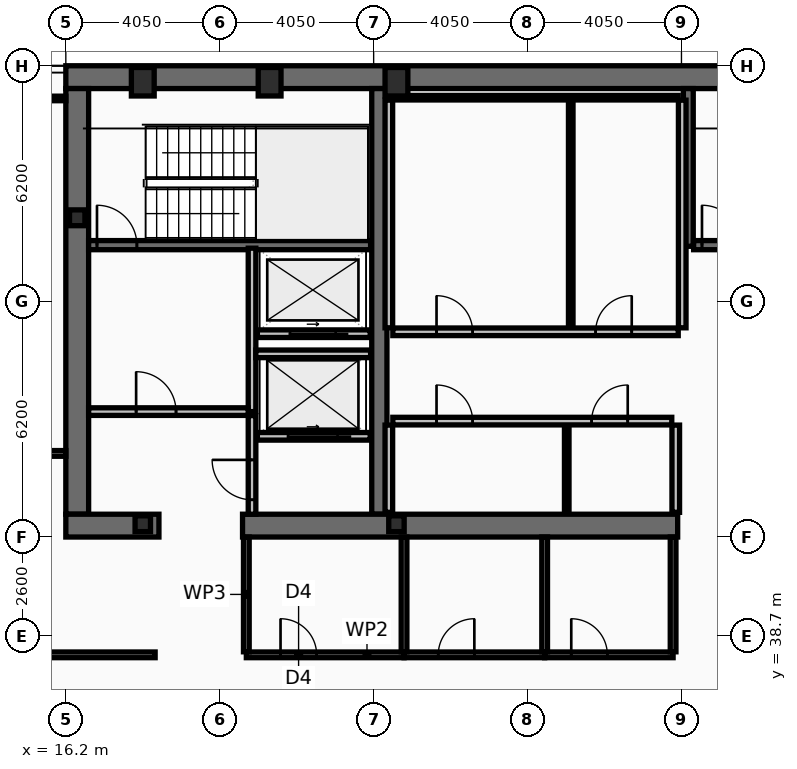
"""IFC4 building model, lengths in metres.
Left out: names, types, materials, properties, quantities, classifications, styles, units other than length and angle.
Written with IfcOpenShell. Run it as: python <this file> out.ifc"""

import sys

from ifc_helpers import new_model, si_unit, direction, frame, frame_2d, origin, origin_2d, place, context, subcontext, project, spatial, rectangle, hollow_rectangle, i_section, extrude, element, fill, save


model = new_model("IFC4")
c1 = context("Model", 3, precision=1e-05, world=origin(), true_north=direction((0.0, 1.0)))
c2 = subcontext(c1, "Body", "Model", "MODEL_VIEW")
j1 = project(units=[si_unit("LENGTHUNIT", "METRE"), si_unit("PLANEANGLEUNIT", "RADIAN")], contexts=[c1])
p1 = place(None, origin())
s1 = spatial("IfcSite", under=j1, at=p1, CompositionType="ELEMENT")
p2 = place(p1, origin())
s2 = spatial("IfcBuilding", under=s1, at=p2, CompositionType="ELEMENT")
p3 = place(p2, frame((0.0, 0.0, 235.4)))
s3 = spatial("IfcBuildingStorey", under=s2, at=p3, CompositionType="ELEMENT", Elevation=235.4)
p4 = place(p3, frame((16.2, 53.4, 0.0), z_axis=(0.0, 0.0, 1.0), x_axis=(1.0, 0.0, 0.0)))
e1 = element("IfcWall", 1, at=p4, inside=s3, PredefinedType="SHEAR", context=c2, shape_type="SweptSolid", body=[
    extrude(rectangle(XDim=40.5, YDim=0.6, at=frame_2d((20.25, 0.0))), origin(), (0.0, 0.0, 1.0), 3.44),
])
p5 = place(p3, frame((16.5, 41.9, 0.0), z_axis=(0.0, 0.0, 1.0), x_axis=(0.0, 1.0, 0.0)))
e2 = element("IfcWall", 2, at=p5, inside=s3, PredefinedType="SHEAR", context=c2, shape_type="SweptSolid", body=[
    extrude(rectangle(XDim=11.2, YDim=0.6, at=frame_2d((5.6, 0.0))), origin(), (0.0, 0.0, 1.0), 3.44),
])
p6 = place(p3, frame((24.45, 41.9, 0.0), z_axis=(0.0, 0.0, 1.0), x_axis=(0.0, 1.0, 0.0)))
e3 = element("IfcWall", 3, at=p6, inside=s3, PredefinedType="SHEAR", context=c2, shape_type="SweptSolid", body=[
    extrude(rectangle(XDim=11.2, YDim=0.4, at=frame_2d((5.6, 0.0))), origin(), (0.0, 0.0, 1.0), 3.44),
])
p7 = place(p3, frame((18.65, 41.6, 0.0), z_axis=(0.0, 0.0, 1.0), x_axis=(-1.0, 0.0, 0.0)))
e4 = element("IfcWall", 4, at=p7, inside=s3, PredefinedType="SHEAR", context=c2, shape_type="SweptSolid", body=[
    extrude(rectangle(XDim=2.45, YDim=0.6, at=frame_2d((1.225, 0.0))), origin(), (0.0, 0.0, 1.0), 3.44),
])
p8 = place(p3, frame((32.3, 41.6, 0.0), z_axis=(0.0, 0.0, 1.0), x_axis=(-1.0, 0.0, 0.0)))
e5 = element("IfcWall", 5, at=p8, inside=s3, PredefinedType="SHEAR", context=c2, shape_type="SweptSolid", body=[
    extrude(rectangle(XDim=11.45, YDim=0.6, at=frame_2d((5.725, 0.0))), origin(), (0.0, 0.0, 1.0), 3.44),
])
p9 = place(p3, frame((32.58, 48.95, 0.0), z_axis=(0.0, 0.0, 1.0), x_axis=(0.0, 1.0, 0.0)))
e6 = element("IfcWall", 6, at=p9, inside=s3, PredefinedType="SHEAR", context=c2, shape_type="SweptSolid", body=[
    extrude(rectangle(XDim=4.15, YDim=0.26, at=frame_2d((2.075, 0.0))), origin(), (0.0, 0.0, 1.0), 3.44),
])
p10 = place(p3, frame((16.8, 48.98, 0.0), z_axis=(0.0, 0.0, 1.0), x_axis=(1.0, 0.0, 0.0)))
e7 = element("IfcWall", 7, at=p10, inside=s3, PredefinedType="SHEAR", context=c2, shape_type="SweptSolid", body=[
    extrude(rectangle(XDim=7.42, YDim=0.24, at=frame_2d((3.71, 0.0))), origin(), (0.0, 0.0, 1.0), 3.44),
])
p11 = place(p10, frame((0.22, 0.0, 0.0)))
e8 = element("IfcOpeningElement", 8, at=p11, cuts=e7, PredefinedType="OPENING", context=c2, shape_type="SweptSolid", body=[
    extrude(rectangle(XDim=1.05, YDim=2.15, at=frame_2d((0.525, 1.075))), frame((0.0, 0.13, 0.0), z_axis=(0.0, -1.0, 0.0), x_axis=(1.0, 0.0, 0.0)), (0.0, 0.0, 1.0), 0.26),
])
p12 = place(p3, frame((32.72, 48.98, 0.0), z_axis=(0.0, 0.0, 1.0), x_axis=(1.0, 0.0, 0.0)))
e9 = element("IfcWall", 9, at=p12, inside=s3, PredefinedType="SHEAR", context=c2, shape_type="SweptSolid", body=[
    extrude(rectangle(XDim=7.56, YDim=0.24, at=frame_2d((3.78, 0.0))), origin(), (0.0, 0.0, 1.0), 3.44),
])
p13 = place(p12, frame((0.22, 0.0, 0.0)))
e10 = element("IfcOpeningElement", 10, at=p13, cuts=e9, PredefinedType="OPENING", context=c2, shape_type="SweptSolid", body=[
    extrude(rectangle(XDim=1.05, YDim=2.15, at=frame_2d((0.525, 1.075))), frame((0.0, 0.13, 0.0), z_axis=(0.0, -1.0, 0.0), x_axis=(1.0, 0.0, 0.0)), (0.0, 0.0, 1.0), 0.26),
])
for number, where, z_axis, x_axis in (
    (11, (18.225, 53.28, 0.0), (0.0, 0.0, 1.0), (1.0, 0.0, 0.0)),
    (12, (21.562, 53.28, 0.0), (0.0, 0.0, 1.0), (1.0, 0.0, 0.0)),
    (13, (24.9, 53.28, 0.0), (0.0, 0.0, 1.0), (1.0, 0.0, 0.0)),
):
    element("IfcColumn", number, at=place(p3, frame(where, z_axis=z_axis, x_axis=x_axis)), inside=s3, PredefinedType="COLUMN", context=c2, shape_type="SweptSolid", body=[
        extrude(hollow_rectangle(XDim=0.6, YDim=0.75, WallThickness=0.045, at=origin_2d()), origin(), (0.0, 0.0, 1.0), 3.6),
    ])
for number, where, z_axis, x_axis in (
    (14, (16.5, 49.7, 0.0), (0.0, 0.0, 1.0), (1.0, 0.0, 0.0)),
    (15, (18.225, 41.65, 0.0), (0.0, 0.0, 1.0), (1.0, 0.0, 0.0)),
    (16, (24.9, 41.65, 0.0), (0.0, 0.0, 1.0), (1.0, 0.0, 0.0)),
):
    element("IfcColumn", number, at=place(p3, frame(where, z_axis=z_axis, x_axis=x_axis)), inside=s3, PredefinedType="COLUMN", context=c2, shape_type="SweptSolid", body=[
        extrude(i_section(OverallWidth=0.406, OverallDepth=0.416, WebThickness=0.03, FlangeThickness=0.048, at=origin_2d()), origin(), (0.0, 0.0, 1.0), 3.6),
    ])
p14 = place(p3, frame((24.21, 43.95, 0.0), z_axis=(0.0, 0.0, 1.0), x_axis=(-1.0, 0.0, 0.0)))
e17 = element("IfcWall", 17, at=p14, inside=s3, PredefinedType="PARTITIONING", context=c2, shape_type="SweptSolid", body=[
    extrude(rectangle(XDim=2.97, YDim=0.2, at=frame_2d((1.485, 0.0))), origin(), (0.0, 0.0, 1.0), 3.44),
])
p15 = place(p14, frame((0.86, 0.0, 0.0)))
e18 = element("IfcOpeningElement", 18, at=p15, cuts=e17, PredefinedType="OPENING", context=c2, shape_type="SweptSolid", body=[
    extrude(rectangle(XDim=1.3, YDim=2.18, at=frame_2d((0.65, 1.09))), frame((0.0, 0.11, 0.0), z_axis=(0.0, -1.0, 0.0), x_axis=(1.0, 0.0, 0.0)), (0.0, 0.0, 1.0), 0.22),
])
p16 = place(p3, frame((24.21, 46.65, 0.0), z_axis=(0.0, 0.0, 1.0), x_axis=(-1.0, 0.0, 0.0)))
e19 = element("IfcWall", 19, at=p16, inside=s3, PredefinedType="PARTITIONING", context=c2, shape_type="SweptSolid", body=[
    extrude(rectangle(XDim=2.97, YDim=0.2, at=frame_2d((1.485, 0.0))), origin(), (0.0, 0.0, 1.0), 3.44),
])
p17 = place(p16, frame((0.91, 0.0, 0.0)))
e20 = element("IfcOpeningElement", 20, at=p17, cuts=e19, PredefinedType="OPENING", context=c2, shape_type="SweptSolid", body=[
    extrude(rectangle(XDim=1.2, YDim=2.18, at=frame_2d((0.6, 1.09))), frame((0.0, 0.11, 0.0), z_axis=(0.0, -1.0, 0.0), x_axis=(1.0, 0.0, 0.0)), (0.0, 0.0, 1.0), 0.22),
])
p18 = place(p3, frame((21.1, 44.6, 0.0), z_axis=(0.0, 0.0, 1.0), x_axis=(0.0, 1.0, 0.0)))
e21 = element("IfcWall", 21, at=p18, inside=s3, PredefinedType="PARTITIONING", context=c2, shape_type="SweptSolid", body=[
    extrude(rectangle(XDim=4.3, YDim=0.2, at=frame_2d((2.15, 0.0))), origin(), (0.0, 0.0, 1.0), 3.44),
])
p19 = place(p3, frame((16.8, 44.6, 0.0), z_axis=(0.0, 0.0, 1.0), x_axis=(1.0, 0.0, 0.0)))
e22 = element("IfcWall", 22, at=p19, inside=s3, PredefinedType="PARTITIONING", context=c2, shape_type="SweptSolid", body=[
    extrude(rectangle(XDim=4.2, YDim=0.2, at=frame_2d((2.1, 0.0))), origin(), (0.0, 0.0, 1.0), 3.44),
])
p20 = place(p19, frame((1.25, 0.0, 0.0)))
e23 = element("IfcOpeningElement", 23, at=p20, cuts=e22, PredefinedType="OPENING", context=c2, shape_type="SweptSolid", body=[
    extrude(rectangle(XDim=1.05, YDim=2.15, at=frame_2d((0.525, 1.075))), frame((0.0, 0.11, 0.0), z_axis=(0.0, -1.0, 0.0), x_axis=(1.0, 0.0, 0.0)), (0.0, 0.0, 1.0), 0.22),
])
p21 = place(p3, frame((21.2, 46.12, 0.0), z_axis=(0.0, 0.0, 1.0), x_axis=(1.0, 0.0, 0.0)))
e24 = element("IfcWall", 24, at=p21, inside=s3, PredefinedType="PARTITIONING", context=c2, shape_type="SweptSolid", body=[
    extrude(rectangle(XDim=3.02, YDim=0.2, at=frame_2d((1.51, 0.0))), origin(), (0.0, 0.0, 1.0), 3.44),
])
p22 = place(p3, frame((21.1, 41.9, 0.0), z_axis=(0.0, 0.0, 1.0), x_axis=(0.0, 1.0, 0.0)))
e25 = element("IfcWall", 25, at=p22, inside=s3, PredefinedType="PARTITIONING", context=c2, shape_type="SweptSolid", body=[
    extrude(rectangle(XDim=2.595, YDim=0.2, at=frame_2d((1.298, 0.0))), origin(), (0.0, 0.0, 1.0), 3.44),
])
p23 = place(p22, frame((0.38, 0.0, 0.0)))
e26 = element("IfcOpeningElement", 26, at=p23, cuts=e25, PredefinedType="OPENING", context=c2, shape_type="SweptSolid", body=[
    extrude(rectangle(XDim=1.05, YDim=2.15, at=frame_2d((0.525, 1.075))), frame((0.0, 0.11, 0.0), z_axis=(0.0, -1.0, 0.0), x_axis=(1.0, 0.0, 0.0)), (0.0, 0.0, 1.0), 0.22),
])
for number, where, z_axis, x_axis in (
    (27, (24.7, 46.805, 0.0), (0.0, 0.0, 1.0), (0.0, 1.0, 0.0)),
    (28, (32.42, 46.805, 0.0), (0.0, 0.0, 1.0), (0.0, 1.0, 0.0)),
):
    element("IfcWall", number, at=place(p3, frame(where, z_axis=z_axis, x_axis=x_axis)), inside=s3, PredefinedType="PARTITIONING", context=c2, shape_type="SweptSolid", body=[
        extrude(rectangle(XDim=5.99, YDim=0.2, at=frame_2d((2.995, 0.0))), origin(), (0.0, 0.0, 1.0), 3.44),
    ])
p24 = place(p3, frame((24.805, 52.86, 0.0), z_axis=(0.0, 0.0, 1.0), x_axis=(1.0, 0.0, 0.0)))
e29 = element("IfcWall", 29, at=p24, inside=s3, PredefinedType="PARTITIONING", context=c2, shape_type="SweptSolid", body=[
    extrude(rectangle(XDim=7.51, YDim=0.12, at=frame_2d((3.755, 0.0))), origin(), (0.0, 0.0, 1.0), 3.44),
])
p25 = place(p3, frame((29.486, 46.805, 0.0), z_axis=(0.0, 0.0, 1.0), x_axis=(0.0, 1.0, 0.0)))
e30 = element("IfcWall", 30, at=p25, inside=s3, PredefinedType="PARTITIONING", context=c2, shape_type="SweptSolid", body=[
    extrude(rectangle(XDim=5.99, YDim=0.12, at=frame_2d((2.995, 0.0))), origin(), (0.0, 0.0, 1.0), 3.44),
])
p26 = place(p3, frame((24.805, 46.7, 0.0), z_axis=(0.0, 0.0, 1.0), x_axis=(1.0, 0.0, 0.0)))
e31 = element("IfcWall", 31, at=p26, inside=s3, PredefinedType="PARTITIONING", context=c2, shape_type="SweptSolid", body=[
    extrude(rectangle(XDim=7.51, YDim=0.2, at=frame_2d((3.755, 0.0))), origin(), (0.0, 0.0, 1.0), 3.44),
])
p27 = place(p26, frame((1.15, 0.0, 0.0)))
e32 = element("IfcOpeningElement", 32, at=p27, cuts=e31, PredefinedType="OPENING", context=c2, shape_type="SweptSolid", body=[
    extrude(rectangle(XDim=0.95, YDim=2.1, at=frame_2d((0.475, 1.05))), frame((0.0, 0.11, 0.0), z_axis=(0.0, -1.0, 0.0), x_axis=(1.0, 0.0, 0.0)), (0.0, 0.0, 1.0), 0.22),
])
p28 = place(p26, frame((5.336, 0.0, 0.0)))
e33 = element("IfcOpeningElement", 33, at=p28, cuts=e31, PredefinedType="OPENING", context=c2, shape_type="SweptSolid", body=[
    extrude(rectangle(XDim=0.95, YDim=2.1, at=frame_2d((0.475, 1.05))), frame((0.0, 0.11, 0.0), z_axis=(0.0, -1.0, 0.0), x_axis=(1.0, 0.0, 0.0)), (0.0, 0.0, 1.0), 0.22),
])
for number, where, z_axis, x_axis in (
    (34, (24.7, 41.95, 0.0), (0.0, 0.0, 1.0), (0.0, 1.0, 0.0)),
    (35, (32.25, 41.95, 0.0), (0.0, 0.0, 1.0), (0.0, 1.0, 0.0)),
):
    element("IfcWall", number, at=place(p3, frame(where, z_axis=z_axis, x_axis=x_axis)), inside=s3, PredefinedType="PARTITIONING", context=c2, shape_type="SweptSolid", body=[
        extrude(rectangle(XDim=2.295, YDim=0.2, at=frame_2d((1.147, 0.0))), origin(), (0.0, 0.0, 1.0), 3.44),
    ])
p29 = place(p3, frame((29.381, 41.95, 0.0), z_axis=(0.0, 0.0, 1.0), x_axis=(0.0, 1.0, 0.0)))
e36 = element("IfcWall", 36, at=p29, inside=s3, PredefinedType="PARTITIONING", context=c2, shape_type="SweptSolid", body=[
    extrude(rectangle(XDim=2.295, YDim=0.12, at=frame_2d((1.147, 0.0))), origin(), (0.0, 0.0, 1.0), 3.44),
])
p30 = place(p3, frame((24.805, 44.35, 0.0), z_axis=(0.0, 0.0, 1.0), x_axis=(1.0, 0.0, 0.0)))
e37 = element("IfcWall", 37, at=p30, inside=s3, PredefinedType="PARTITIONING", context=c2, shape_type="SweptSolid", body=[
    extrude(rectangle(XDim=7.34, YDim=0.2, at=frame_2d((3.67, 0.0))), origin(), (0.0, 0.0, 1.0), 3.44),
])
p31 = place(p30, frame((1.15, 0.0, 0.0)))
e38 = element("IfcOpeningElement", 38, at=p31, cuts=e37, PredefinedType="OPENING", context=c2, shape_type="SweptSolid", body=[
    extrude(rectangle(XDim=0.95, YDim=2.1, at=frame_2d((0.475, 1.05))), frame((0.0, 0.11, 0.0), z_axis=(0.0, -1.0, 0.0), x_axis=(1.0, 0.0, 0.0)), (0.0, 0.0, 1.0), 0.22),
])
p32 = place(p30, frame((5.231, 0.0, 0.0)))
e39 = element("IfcOpeningElement", 39, at=p32, cuts=e37, PredefinedType="OPENING", context=c2, shape_type="SweptSolid", body=[
    extrude(rectangle(XDim=0.95, YDim=2.1, at=frame_2d((0.475, 1.05))), frame((0.0, 0.11, 0.0), z_axis=(0.0, -1.0, 0.0), x_axis=(1.0, 0.0, 0.0)), (0.0, 0.0, 1.0), 0.22),
])
p33 = place(p3, frame((20.95, 38.2, 0.0), z_axis=(0.0, 0.0, 1.0), x_axis=(1.0, 0.0, 0.0)))
e40 = element("IfcWall", 40, at=p33, inside=s3, PredefinedType="PARTITIONING", context=c2, shape_type="SweptSolid", body=[
    extrude(rectangle(XDim=4.15, YDim=0.15, at=frame_2d((2.075, 0.0))), origin(), (0.0, 0.0, 1.0), 2.78),
])
p34 = place(p33, frame((0.9, 0.0, 0.0)))
e41 = element("IfcOpeningElement", 41, at=p34, cuts=e40, PredefinedType="OPENING", context=c2, shape_type="SweptSolid", body=[
    extrude(rectangle(XDim=0.95, YDim=2.05, at=frame_2d((0.475, 1.025))), frame((0.0, 0.085, 0.0), z_axis=(0.0, -1.0, 0.0), x_axis=(1.0, 0.0, 0.0)), (0.0, 0.0, 1.0), 0.17),
])
p35 = place(p3, frame((25.1, 38.2, 0.0), z_axis=(0.0, 0.0, 1.0), x_axis=(1.0, 0.0, 0.0)))
e42 = element("IfcWall", 42, at=p35, inside=s3, PredefinedType="PARTITIONING", context=c2, shape_type="SweptSolid", body=[
    extrude(rectangle(XDim=3.7, YDim=0.15, at=frame_2d((1.85, 0.0))), origin(), (0.0, 0.0, 1.0), 2.78),
])
p36 = place(p35, frame((0.9, 0.0, 0.0)))
e43 = element("IfcOpeningElement", 43, at=p36, cuts=e42, PredefinedType="OPENING", context=c2, shape_type="SweptSolid", body=[
    extrude(rectangle(XDim=0.95, YDim=2.05, at=frame_2d((0.475, 1.025))), frame((0.0, 0.085, 0.0), z_axis=(0.0, -1.0, 0.0), x_axis=(1.0, 0.0, 0.0)), (0.0, 0.0, 1.0), 0.17),
])
p37 = place(p3, frame((28.8, 38.2, 0.0), z_axis=(0.0, 0.0, 1.0), x_axis=(1.0, 0.0, 0.0)))
e44 = element("IfcWall", 44, at=p37, inside=s3, PredefinedType="PARTITIONING", context=c2, shape_type="SweptSolid", body=[
    extrude(rectangle(XDim=3.38, YDim=0.15, at=frame_2d((1.69, 0.0))), origin(), (0.0, 0.0, 1.0), 2.78),
])
p38 = place(p37, frame((0.7, 0.0, 0.0)))
e45 = element("IfcOpeningElement", 45, at=p38, cuts=e44, PredefinedType="OPENING", context=c2, shape_type="SweptSolid", body=[
    extrude(rectangle(XDim=0.95, YDim=2.05, at=frame_2d((0.475, 1.025))), frame((0.0, 0.085, 0.0), z_axis=(0.0, -1.0, 0.0), x_axis=(1.0, 0.0, 0.0)), (0.0, 0.0, 1.0), 0.17),
])
p39 = place(p3, frame((20.95, 38.28, 0.0), z_axis=(0.0, 0.0, 1.0), x_axis=(0.0, 1.0, 0.0)))
e46 = element("IfcWall", 46, at=p39, inside=s3, PredefinedType="PARTITIONING", context=c2, shape_type="SweptSolid", body=[
    extrude(rectangle(XDim=3.02, YDim=0.15, at=frame_2d((1.51, 0.0))), origin(), (0.0, 0.0, 1.0), 3.44),
])
p40 = place(p3, frame((25.1, 38.28, 0.0), z_axis=(0.0, 0.0, 1.0), x_axis=(0.0, 1.0, 0.0)))
e47 = element("IfcWall", 47, at=p40, inside=s3, PredefinedType="PARTITIONING", context=c2, shape_type="SweptSolid", body=[
    extrude(rectangle(XDim=3.02, YDim=0.15, at=frame_2d((1.51, 0.0))), origin(), (0.0, 0.0, 1.0), 2.78),
])
for number, where, z_axis, x_axis in (
    (48, (28.8, 38.28, 0.0), (0.0, 0.0, 1.0), (0.0, 1.0, 0.0)),
    (49, (32.18, 38.28, 0.0), (0.0, 0.0, 1.0), (0.0, 1.0, 0.0)),
):
    element("IfcWall", number, at=place(p3, frame(where, z_axis=z_axis, x_axis=x_axis)), inside=s3, PredefinedType="PARTITIONING", context=c2, shape_type="SweptSolid", body=[
        extrude(rectangle(XDim=3.02, YDim=0.15, at=frame_2d((1.51, 0.0))), origin(), (0.0, 0.0, 1.0), 3.44),
    ])
p41 = place(p3, frame((8.03, 38.2, 0.0), z_axis=(0.0, 0.0, 1.0), x_axis=(1.0, 0.0, 0.0)))
e50 = element("IfcWall", 50, at=p41, inside=s3, PredefinedType="PARTITIONING", context=c2, shape_type="SweptSolid", body=[
    extrude(rectangle(XDim=10.52, YDim=0.15, at=frame_2d((5.26, 0.0))), origin(), (0.0, 0.0, 1.0), 2.78),
])
p42 = place(p41, frame((6.32, 0.0, 0.0)))
e51 = element("IfcOpeningElement", 51, at=p42, cuts=e50, PredefinedType="OPENING", context=c2, shape_type="SweptSolid", body=[
    extrude(rectangle(XDim=0.95, YDim=2.05, at=frame_2d((0.475, 1.025))), frame((0.0, 0.085, 0.0), z_axis=(0.0, -1.0, 0.0), x_axis=(1.0, 0.0, 0.0)), (0.0, 0.0, 1.0), 0.17),
])
p43 = place(p3, frame((8.095, 43.5, 0.0), z_axis=(0.0, 0.0, 1.0), x_axis=(1.0, 0.0, 0.0)))
e52 = element("IfcWall", 52, at=p43, inside=s3, PredefinedType="PARTITIONING", context=c2, shape_type="SweptSolid", body=[
    extrude(rectangle(XDim=8.105, YDim=0.15, at=frame_2d((4.052, 0.0))), origin(), (0.0, 0.0, 1.0), 2.09),
])
p44 = place(p43, frame((6.32, 0.0, 0.0)))
e53 = element("IfcOpeningElement", 53, at=p44, cuts=e52, PredefinedType="OPENING", context=c2, shape_type="SweptSolid", body=[
    extrude(rectangle(XDim=0.9, YDim=2.05, at=frame_2d((0.45, 1.025))), frame((0.0, 0.085, 0.0), z_axis=(0.0, -1.0, 0.0), x_axis=(1.0, 0.0, 0.0)), (0.0, 0.0, 1.0), 0.17),
])
p45 = place(p3, frame((8.095, 52.84, 0.0), z_axis=(0.0, 0.0, 1.0), x_axis=(1.0, 0.0, 0.0)))
e54 = element("IfcWall", 54, at=p45, inside=s3, PredefinedType="PARTITIONING", context=c2, shape_type="SweptSolid", body=[
    extrude(rectangle(XDim=8.105, YDim=0.12, at=frame_2d((4.052, 0.0))), origin(), (0.0, 0.0, 1.0), 3.44),
])
p46 = place(p11, origin())
e55 = element("IfcDoor", 55, at=p46, inside=s3, OperationType="SINGLE_SWING_LEFT", PredefinedType="DOOR", context=c2, shape_type="SweptSolid", body=[
    extrude(rectangle(XDim=1.05, YDim=2.15, at=frame_2d((0.525, 1.075))), frame((0.0, 0.025, 0.0), z_axis=(0.0, -1.0, 0.0), x_axis=(1.0, 0.0, 0.0)), (0.0, 0.0, 1.0), 0.05),
])
fill(e8, e55)
p47 = place(p13, origin())
e56 = element("IfcDoor", 56, at=p47, inside=s3, OperationType="SINGLE_SWING_LEFT", PredefinedType="DOOR", context=c2, shape_type="SweptSolid", body=[
    extrude(rectangle(XDim=1.05, YDim=2.15, at=frame_2d((0.525, 1.075))), frame((0.0, 0.025, 0.0), z_axis=(0.0, -1.0, 0.0), x_axis=(1.0, 0.0, 0.0)), (0.0, 0.0, 1.0), 0.05),
])
fill(e10, e56)
p48 = place(p15, origin())
e57 = element("IfcDoor", 57, at=p48, inside=s3, OperationType="SLIDING_TO_LEFT", PredefinedType="DOOR", context=c2, shape_type="SweptSolid", body=[
    extrude(rectangle(XDim=1.3, YDim=2.18, at=frame_2d((0.65, 1.09))), frame((0.0, 0.025, 0.0), z_axis=(0.0, -1.0, 0.0), x_axis=(1.0, 0.0, 0.0)), (0.0, 0.0, 1.0), 0.05),
])
fill(e18, e57)
p49 = place(p17, origin())
e58 = element("IfcDoor", 58, at=p49, inside=s3, OperationType="SLIDING_TO_LEFT", PredefinedType="DOOR", context=c2, shape_type="SweptSolid", body=[
    extrude(rectangle(XDim=1.2, YDim=2.18, at=frame_2d((0.6, 1.09))), frame((0.0, 0.025, 0.0), z_axis=(0.0, -1.0, 0.0), x_axis=(1.0, 0.0, 0.0)), (0.0, 0.0, 1.0), 0.05),
])
fill(e20, e58)
p50 = place(p20, origin())
e59 = element("IfcDoor", 59, at=p50, inside=s3, OperationType="SINGLE_SWING_LEFT", PredefinedType="DOOR", context=c2, shape_type="SweptSolid", body=[
    extrude(rectangle(XDim=1.05, YDim=2.15, at=frame_2d((0.525, 1.075))), frame((0.0, 0.025, 0.0), z_axis=(0.0, -1.0, 0.0), x_axis=(1.0, 0.0, 0.0)), (0.0, 0.0, 1.0), 0.05),
])
fill(e23, e59)
p51 = place(p23, origin())
e60 = element("IfcDoor", 60, at=p51, inside=s3, OperationType="SINGLE_SWING_RIGHT", PredefinedType="DOOR", context=c2, shape_type="SweptSolid", body=[
    extrude(rectangle(XDim=1.05, YDim=2.15, at=frame_2d((0.525, 1.075))), frame((0.0, 0.025, 0.0), z_axis=(0.0, -1.0, 0.0), x_axis=(1.0, 0.0, 0.0)), (0.0, 0.0, 1.0), 0.05),
])
fill(e26, e60)
p52 = place(p27, origin())
e61 = element("IfcDoor", 61, at=p52, inside=s3, OperationType="SINGLE_SWING_LEFT", PredefinedType="DOOR", context=c2, shape_type="SweptSolid", body=[
    extrude(rectangle(XDim=0.95, YDim=2.1, at=frame_2d((0.475, 1.05))), frame((0.0, 0.025, 0.0), z_axis=(0.0, -1.0, 0.0), x_axis=(1.0, 0.0, 0.0)), (0.0, 0.0, 1.0), 0.05),
])
fill(e32, e61)
p53 = place(p28, origin())
e62 = element("IfcDoor", 62, at=p53, inside=s3, OperationType="SINGLE_SWING_RIGHT", PredefinedType="DOOR", context=c2, shape_type="SweptSolid", body=[
    extrude(rectangle(XDim=0.95, YDim=2.1, at=frame_2d((0.475, 1.05))), frame((0.0, 0.025, 0.0), z_axis=(0.0, -1.0, 0.0), x_axis=(1.0, 0.0, 0.0)), (0.0, 0.0, 1.0), 0.05),
])
fill(e33, e62)
p54 = place(p31, origin())
e63 = element("IfcDoor", 63, at=p54, inside=s3, OperationType="SINGLE_SWING_LEFT", PredefinedType="DOOR", context=c2, shape_type="SweptSolid", body=[
    extrude(rectangle(XDim=0.95, YDim=2.1, at=frame_2d((0.475, 1.05))), frame((0.0, 0.025, 0.0), z_axis=(0.0, -1.0, 0.0), x_axis=(1.0, 0.0, 0.0)), (0.0, 0.0, 1.0), 0.05),
])
fill(e38, e63)
p55 = place(p32, origin())
e64 = element("IfcDoor", 64, at=p55, inside=s3, OperationType="SINGLE_SWING_RIGHT", PredefinedType="DOOR", context=c2, shape_type="SweptSolid", body=[
    extrude(rectangle(XDim=0.95, YDim=2.1, at=frame_2d((0.475, 1.05))), frame((0.0, 0.025, 0.0), z_axis=(0.0, -1.0, 0.0), x_axis=(1.0, 0.0, 0.0)), (0.0, 0.0, 1.0), 0.05),
])
fill(e39, e64)
p56 = place(p34, origin())
e65 = element("IfcDoor", 65, at=p56, inside=s3, OperationType="SINGLE_SWING_LEFT", PredefinedType="DOOR", context=c2, shape_type="SweptSolid", body=[
    extrude(rectangle(XDim=0.95, YDim=2.05, at=frame_2d((0.475, 1.025))), frame((0.0, 0.025, 0.0), z_axis=(0.0, -1.0, 0.0), x_axis=(1.0, 0.0, 0.0)), (0.0, 0.0, 1.0), 0.05),
])
fill(e41, e65)
p57 = place(p36, origin())
e66 = element("IfcDoor", 66, at=p57, inside=s3, OperationType="SINGLE_SWING_RIGHT", PredefinedType="DOOR", context=c2, shape_type="SweptSolid", body=[
    extrude(rectangle(XDim=0.95, YDim=2.05, at=frame_2d((0.475, 1.025))), frame((0.0, 0.025, 0.0), z_axis=(0.0, -1.0, 0.0), x_axis=(1.0, 0.0, 0.0)), (0.0, 0.0, 1.0), 0.05),
])
fill(e43, e66)
p58 = place(p38, origin())
e67 = element("IfcDoor", 67, at=p58, inside=s3, OperationType="SINGLE_SWING_LEFT", PredefinedType="DOOR", context=c2, shape_type="SweptSolid", body=[
    extrude(rectangle(XDim=0.95, YDim=2.05, at=frame_2d((0.475, 1.025))), frame((0.0, 0.025, 0.0), z_axis=(0.0, -1.0, 0.0), x_axis=(1.0, 0.0, 0.0)), (0.0, 0.0, 1.0), 0.05),
])
fill(e45, e67)
save(model, sys.argv[1])
